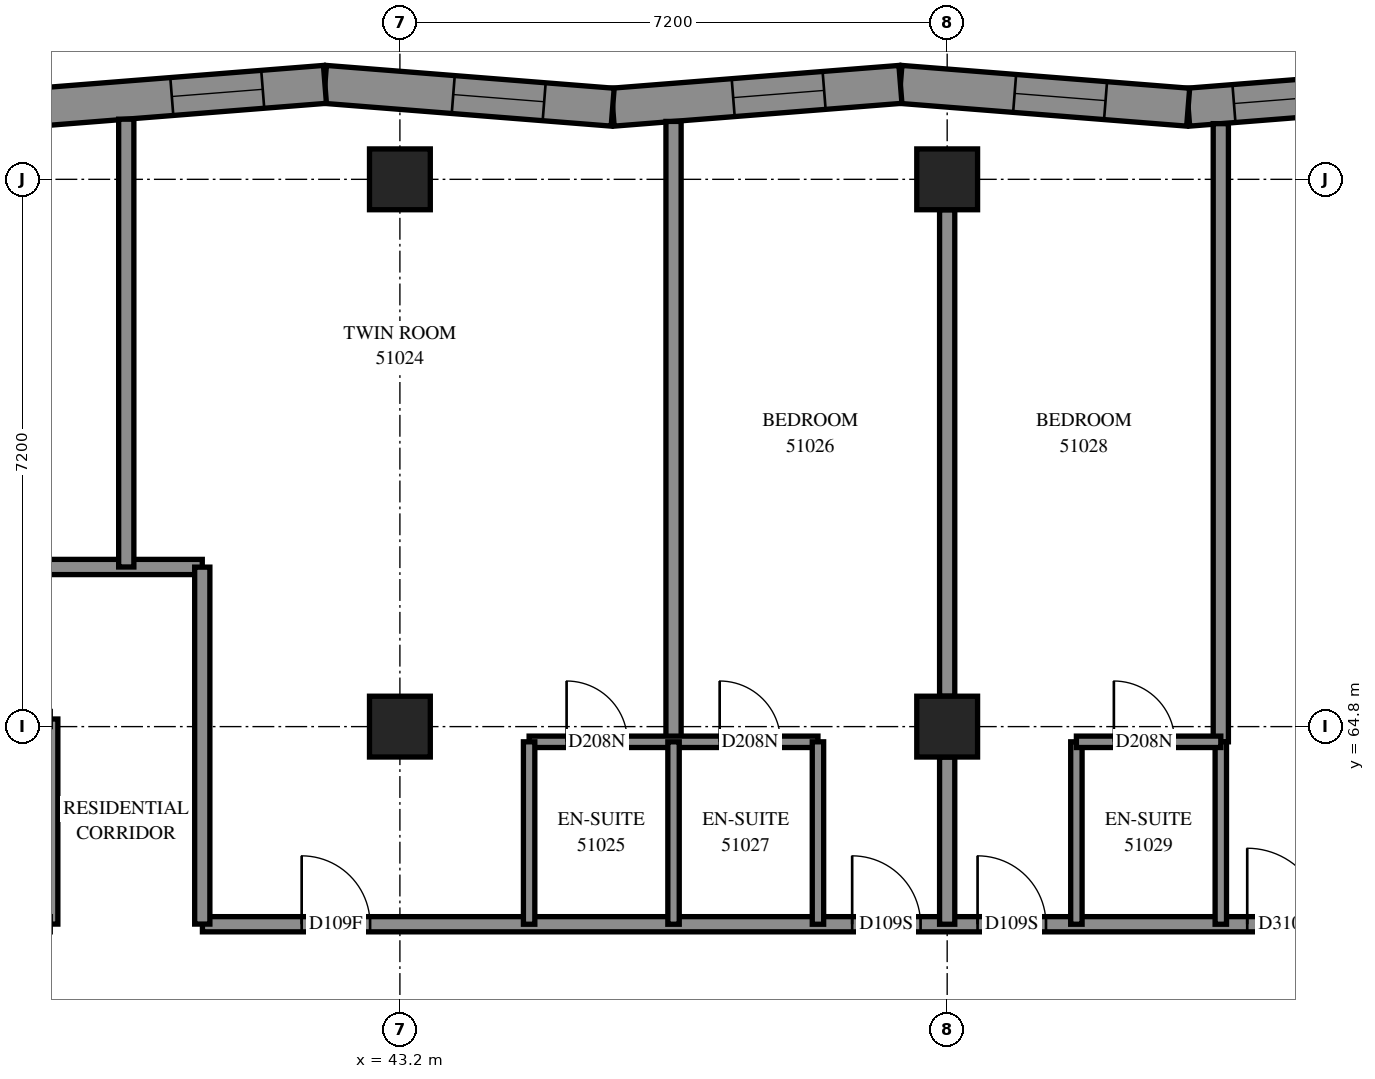
"""IFC4 building model, lengths in metres.
Left out: names, types, materials, properties, quantities, classifications, styles, units other than length and angle.
Written with IfcOpenShell. Run it as: python <this file> out.ifc"""

import sys

from ifc_helpers import new_model, si_unit, direction, frame, frame_2d, origin, origin_2d, place, context, subcontext, project, spatial, polyline, rectangle, outline, extrude, element, fill, save


model = new_model("IFC4")
c1 = context("Model", 3, precision=1e-05, world=origin(), true_north=direction((0.0, 1.0)))
c2 = subcontext(c1, "Body", "Model", "MODEL_VIEW")
j1 = project(units=[si_unit("LENGTHUNIT", "METRE"), si_unit("PLANEANGLEUNIT", "RADIAN")], contexts=[c1])
p1 = place(None, origin())
s1 = spatial("IfcSite", under=j1, at=p1, CompositionType="ELEMENT")
p2 = place(p1, origin())
s2 = spatial("IfcBuilding", under=s1, at=p2, CompositionType="ELEMENT")
p3 = place(p2, frame((0.0, 0.0, 189.6)))
s3 = spatial("IfcBuildingStorey", under=s2, at=p3, CompositionType="ELEMENT", Elevation=189.6)
for number, where, z_axis, x_axis in (
    (1, (43.2, 64.8, 0.0), (0.0, 0.0, 1.0), (1.0, 0.0, 0.0)),
    (2, (43.2, 72.0, 0.0), (0.0, 0.0, 1.0), (1.0, 0.0, 0.0)),
    (3, (50.4, 64.8, 0.0), (0.0, 0.0, 1.0), (1.0, 0.0, 0.0)),
    (4, (50.4, 72.0, 0.0), (0.0, 0.0, 1.0), (1.0, 0.0, 0.0)),
):
    element("IfcColumn", number, at=place(p3, frame(where, z_axis=z_axis, x_axis=x_axis)), inside=s3, PredefinedType="COLUMN", context=c2, shape_type="SweptSolid", body=[
        extrude(rectangle(XDim=0.8, YDim=0.8, at=origin_2d()), origin(), (0.0, 0.0, 1.0), 3.1),
    ])
p4 = place(p3, frame((57.356, 73.249, 0.0), z_axis=(0.0, 0.0, 1.0), x_axis=(-0.9968746163, -0.078999996, 0.0)))
e5 = element("IfcWall", 5, at=p4, inside=s3, PredefinedType="SOLIDWALL", context=c2, shape_type="SweptSolid", body=[
    extrude(outline(polyline([(-0.02, -0.25), (3.778, -0.25), (3.817, 0.25), (0.02, 0.25), (-0.02, -0.25)])), origin(), (0.0, 0.0, 1.0), 3.1),
])
p5 = place(p4, frame((0.393, 0.0, 0.45)))
e6 = element("IfcOpeningElement", 6, at=p5, cuts=e5, PredefinedType="OPENING", context=c2, shape_type="SweptSolid", body=[
    extrude(rectangle(XDim=1.3, YDim=2.5, at=frame_2d((0.65, 1.25))), frame((0.0, 0.26, 0.0), z_axis=(0.0, -1.0, 0.0), x_axis=(1.0, 0.0, 0.0)), (0.0, 0.0, 1.0), 0.52),
])
p6 = place(p4, frame((1.893, 0.0, 0.45)))
e7 = element("IfcOpeningElement", 7, at=p6, cuts=e5, PredefinedType="OPENING", context=c2, shape_type="SweptSolid", body=[
    extrude(rectangle(XDim=1.3, YDim=2.5, at=frame_2d((0.65, 1.25))), frame((0.0, 0.26, 0.0), z_axis=(0.0, -1.0, 0.0), x_axis=(1.0, 0.0, 0.0)), (0.0, 0.0, 1.0), 0.52),
])
p7 = place(p3, frame((53.571, 72.949, 0.0), z_axis=(0.0, 0.0, 1.0), x_axis=(-0.9968747806, 0.0789979222, 0.0)))
e8 = element("IfcWall", 8, at=p7, inside=s3, PredefinedType="SOLIDWALL", context=c2, shape_type="SweptSolid", body=[
    extrude(outline(polyline([(0.02, -0.25), (3.817, -0.25), (3.778, 0.25), (-0.02, 0.25), (0.02, -0.25)])), origin(), (0.0, 0.0, 1.0), 3.1),
])
p8 = place(p7, frame((1.09, 0.0, 0.45)))
e9 = element("IfcOpeningElement", 9, at=p8, cuts=e8, PredefinedType="OPENING", context=c2, shape_type="SweptSolid", body=[
    extrude(rectangle(XDim=1.2, YDim=2.5, at=frame_2d((0.6, 1.25))), frame((0.0, 0.26, 0.0), z_axis=(0.0, -1.0, 0.0), x_axis=(1.0, 0.0, 0.0)), (0.0, 0.0, 1.0), 0.52),
])
p9 = place(p3, frame((49.785, 73.249, 0.0), z_axis=(0.0, 0.0, 1.0), x_axis=(-0.9968746163, -0.078999996, 0.0)))
e10 = element("IfcWall", 10, at=p9, inside=s3, PredefinedType="SOLIDWALL", context=c2, shape_type="SweptSolid", body=[
    extrude(outline(polyline([(-0.02, -0.25), (3.778, -0.25), (3.817, 0.25), (0.02, 0.25), (-0.02, -0.25)])), origin(), (0.0, 0.0, 1.0), 3.1),
])
p10 = place(p9, frame((1.007, 0.0, 0.45)))
e11 = element("IfcOpeningElement", 11, at=p10, cuts=e10, PredefinedType="OPENING", context=c2, shape_type="SweptSolid", body=[
    extrude(rectangle(XDim=1.2, YDim=2.5, at=frame_2d((0.6, 1.25))), frame((0.0, 0.26, 0.0), z_axis=(0.0, -1.0, 0.0), x_axis=(1.0, 0.0, 0.0)), (0.0, 0.0, 1.0), 0.52),
])
p11 = place(p3, frame((45.999, 72.949, 0.0), z_axis=(0.0, 0.0, 1.0), x_axis=(-0.9968746163, 0.078999996, 0.0)))
e12 = element("IfcWall", 12, at=p11, inside=s3, PredefinedType="SOLIDWALL", context=c2, shape_type="SweptSolid", body=[
    extrude(outline(polyline([(0.02, -0.25), (3.817, -0.25), (3.778, 0.25), (-0.02, 0.25), (0.02, -0.25)])), origin(), (0.0, 0.0, 1.0), 3.1),
])
p12 = place(p11, frame((0.904, 0.0, 0.45)))
e13 = element("IfcOpeningElement", 13, at=p12, cuts=e12, PredefinedType="OPENING", context=c2, shape_type="SweptSolid", body=[
    extrude(rectangle(XDim=1.2, YDim=2.5, at=frame_2d((0.6, 1.25))), frame((0.0, 0.26, 0.0), z_axis=(0.0, -1.0, 0.0), x_axis=(1.0, 0.0, 0.0)), (0.0, 0.0, 1.0), 0.52),
])
p13 = place(p3, frame((42.214, 73.249, 0.0), z_axis=(0.0, 0.0, 1.0), x_axis=(-0.9968746163, -0.078999996, 0.0)))
e14 = element("IfcWall", 14, at=p13, inside=s3, PredefinedType="SOLIDWALL", context=c2, shape_type="SweptSolid", body=[
    extrude(outline(polyline([(-0.02, -0.25), (3.778, -0.25), (3.817, 0.25), (0.02, 0.25), (-0.02, -0.25)])), origin(), (0.0, 0.0, 1.0), 3.1),
])
p14 = place(p13, frame((0.821, 0.0, 0.45)))
e15 = element("IfcOpeningElement", 15, at=p14, cuts=e14, PredefinedType="OPENING", context=c2, shape_type="SweptSolid", body=[
    extrude(rectangle(XDim=1.2, YDim=2.5, at=frame_2d((0.6, 1.25))), frame((0.0, 0.26, 0.0), z_axis=(0.0, -1.0, 0.0), x_axis=(1.0, 0.0, 0.0)), (0.0, 0.0, 1.0), 0.52),
])
p15 = place(p3, frame((21.602, 66.9, 0.0), z_axis=(0.0, 0.0, 1.0), x_axis=(1.0, 0.0, 0.0)))
e16 = element("IfcWall", 16, at=p15, inside=s3, PredefinedType="PARTITIONING", context=c2, shape_type="SweptSolid", body=[
    extrude(rectangle(XDim=18.998, YDim=0.2, at=frame_2d((9.499, 0.0))), origin(), (0.0, 0.0, 1.0), 3.1),
])
p16 = place(p15, frame((5.972, 0.0, 0.0)))
e17 = element("IfcOpeningElement", 17, at=p16, cuts=e16, PredefinedType="OPENING", context=c2, shape_type="SweptSolid", body=[
    extrude(rectangle(XDim=1.0, YDim=2.1, at=frame_2d((0.5, 1.05))), frame((0.0, 0.11, 0.0), z_axis=(0.0, -1.0, 0.0), x_axis=(1.0, 0.0, 0.0)), (0.0, 0.0, 1.0), 0.22),
])
p17 = place(p15, frame((13.172, 0.0, 0.0)))
e18 = element("IfcOpeningElement", 18, at=p17, cuts=e16, PredefinedType="OPENING", context=c2, shape_type="SweptSolid", body=[
    extrude(rectangle(XDim=1.0, YDim=2.1, at=frame_2d((0.5, 1.05))), frame((0.0, 0.11, 0.0), z_axis=(0.0, -1.0, 0.0), x_axis=(1.0, 0.0, 0.0)), (0.0, 0.0, 1.0), 0.22),
])
p18 = place(p3, frame((40.602, 62.2, 0.0), z_axis=(0.0, 0.0, 1.0), x_axis=(1.0, 0.0, 0.0)))
e19 = element("IfcWall", 19, at=p18, inside=s3, PredefinedType="PARTITIONING", context=c2, shape_type="SweptSolid", body=[
    extrude(rectangle(XDim=14.998, YDim=0.2, at=frame_2d((7.499, 0.0))), origin(), (0.0, 0.0, 1.0), 3.1),
])
p19 = place(p18, frame((1.306, 0.0, 0.0)))
e20 = element("IfcOpeningElement", 20, at=p19, cuts=e19, PredefinedType="OPENING", context=c2, shape_type="SweptSolid", body=[
    extrude(rectangle(XDim=0.9, YDim=2.1, at=frame_2d((0.45, 1.05))), frame((0.0, 0.11, 0.0), z_axis=(0.0, -1.0, 0.0), x_axis=(1.0, 0.0, 0.0)), (0.0, 0.0, 1.0), 0.22),
])
p20 = place(p18, frame((8.548, 0.0, 0.0)))
e21 = element("IfcOpeningElement", 21, at=p20, cuts=e19, PredefinedType="OPENING", context=c2, shape_type="SweptSolid", body=[
    extrude(rectangle(XDim=0.9, YDim=2.1, at=frame_2d((0.45, 1.05))), frame((0.0, 0.11, 0.0), z_axis=(0.0, -1.0, 0.0), x_axis=(1.0, 0.0, 0.0)), (0.0, 0.0, 1.0), 0.22),
])
p21 = place(p18, frame((10.198, 0.0, 0.0)))
e22 = element("IfcOpeningElement", 22, at=p21, cuts=e19, PredefinedType="OPENING", context=c2, shape_type="SweptSolid", body=[
    extrude(rectangle(XDim=0.9, YDim=2.1, at=frame_2d((0.45, 1.05))), frame((0.0, 0.11, 0.0), z_axis=(0.0, -1.0, 0.0), x_axis=(1.0, 0.0, 0.0)), (0.0, 0.0, 1.0), 0.22),
])
p22 = place(p18, frame((13.746, 0.0, 0.0)))
e23 = element("IfcOpeningElement", 23, at=p22, cuts=e19, PredefinedType="OPENING", context=c2, shape_type="SweptSolid", body=[
    extrude(rectangle(XDim=1.0, YDim=2.1, at=frame_2d((0.5, 1.05))), frame((0.0, 0.11, 0.0), z_axis=(0.0, -1.0, 0.0), x_axis=(1.0, 0.0, 0.0)), (0.0, 0.0, 1.0), 0.22),
])
p23 = place(p3, frame((46.8, 64.6, 0.0), z_axis=(0.0, 0.0, 1.0), x_axis=(0.0, 1.0, 0.0)))
e24 = element("IfcWall", 24, at=p23, inside=s3, PredefinedType="PARTITIONING", context=c2, shape_type="SweptSolid", body=[
    extrude(rectangle(XDim=8.162, YDim=0.2, at=frame_2d((4.081, 0.0))), origin(), (0.0, 0.0, 1.0), 3.1),
])
p24 = place(p3, frame((54.0, 64.6, 0.0), z_axis=(0.0, 0.0, 1.0), x_axis=(0.0, 1.0, 0.0)))
e25 = element("IfcWall", 25, at=p24, inside=s3, PredefinedType="PARTITIONING", context=c2, shape_type="SweptSolid", body=[
    extrude(rectangle(XDim=8.133, YDim=0.2, at=frame_2d((4.066, 0.0))), origin(), (0.0, 0.0, 1.0), 3.1),
])
p25 = place(p3, frame((50.4, 65.2, 0.0), z_axis=(0.0, 0.0, 1.0), x_axis=(0.0, 1.0, 0.0)))
e26 = element("IfcWall", 26, at=p25, inside=s3, PredefinedType="PARTITIONING", context=c2, shape_type="SweptSolid", body=[
    extrude(rectangle(XDim=6.4, YDim=0.2, at=frame_2d((3.2, 0.0))), origin(), (0.0, 0.0, 1.0), 3.1),
])
p26 = place(p3, frame((39.6, 66.9, 0.0), z_axis=(0.0, 0.0, 1.0), x_axis=(0.0, 1.0, 0.0)))
e27 = element("IfcWall", 27, at=p26, inside=s3, PredefinedType="PARTITIONING", context=c2, shape_type="SweptSolid", body=[
    extrude(rectangle(XDim=5.891, YDim=0.2, at=frame_2d((2.946, 0.0))), origin(), (0.0, 0.0, 1.0), 3.1),
])
p27 = place(p3, frame((40.6, 62.202, 0.0), z_axis=(0.0, 0.0, 1.0), x_axis=(0.0, 1.0, 0.0)))
e28 = element("IfcWall", 28, at=p27, inside=s3, PredefinedType="PARTITIONING", context=c2, shape_type="SweptSolid", body=[
    extrude(rectangle(XDim=4.696, YDim=0.2, at=frame_2d((2.348, 0.0))), origin(), (0.0, 0.0, 1.0), 3.1),
])
p28 = place(p3, frame((44.9, 64.6, 0.0), z_axis=(0.0, 0.0, 1.0), x_axis=(1.0, 0.0, 0.0)))
e29 = element("IfcWall", 29, at=p28, inside=s3, PredefinedType="PARTITIONING", context=c2, shape_type="SweptSolid", body=[
    extrude(rectangle(XDim=3.8, YDim=0.15, at=frame_2d((1.9, 0.0))), origin(), (0.0, 0.0, 1.0), 3.1),
])
p29 = place(p28, frame((0.493, 0.0, 0.0)))
e30 = element("IfcOpeningElement", 30, at=p29, cuts=e29, PredefinedType="OPENING", context=c2, shape_type="SweptSolid", body=[
    extrude(rectangle(XDim=0.8, YDim=2.1, at=frame_2d((0.4, 1.05))), frame((0.0, 0.085, 0.0), z_axis=(0.0, -1.0, 0.0), x_axis=(1.0, 0.0, 0.0)), (0.0, 0.0, 1.0), 0.17),
])
p30 = place(p28, frame((2.507, 0.0, 0.0)))
e31 = element("IfcOpeningElement", 31, at=p30, cuts=e29, PredefinedType="OPENING", context=c2, shape_type="SweptSolid", body=[
    extrude(rectangle(XDim=0.8, YDim=2.1, at=frame_2d((0.4, 1.05))), frame((0.0, 0.085, 0.0), z_axis=(0.0, -1.0, 0.0), x_axis=(1.0, 0.0, 0.0)), (0.0, 0.0, 1.0), 0.17),
])
p31 = place(p3, frame((38.6, 62.202, 0.0), z_axis=(0.0, 0.0, 1.0), x_axis=(0.0, 1.0, 0.0)))
e32 = element("IfcWall", 32, at=p31, inside=s3, PredefinedType="PARTITIONING", context=c2, shape_type="SweptSolid", body=[
    extrude(rectangle(XDim=2.698, YDim=0.2, at=frame_2d((1.349, 0.0))), origin(), (0.0, 0.0, 1.0), 3.1),
])
for number, where, z_axis, x_axis in (
    (33, (44.9, 62.2, 0.0), (0.0, 0.0, 1.0), (0.0, 1.0, 0.0)),
    (34, (46.8, 62.2, 0.0), (0.0, 0.0, 1.0), (0.0, 1.0, 0.0)),
    (35, (48.7, 62.2, 0.0), (0.0, 0.0, 1.0), (0.0, 1.0, 0.0)),
    (36, (52.1, 62.2, 0.0), (0.0, 0.0, 1.0), (0.0, 1.0, 0.0)),
    (37, (54.0, 62.2, 0.0), (0.0, 0.0, 1.0), (0.0, 1.0, 0.0)),
):
    element("IfcWall", number, at=place(p3, frame(where, z_axis=z_axis, x_axis=x_axis)), inside=s3, PredefinedType="PARTITIONING", context=c2, shape_type="SweptSolid", body=[
        extrude(rectangle(XDim=2.4, YDim=0.15, at=frame_2d((1.2, 0.0))), origin(), (0.0, 0.0, 1.0), 3.1),
    ])
p32 = place(p3, frame((50.4, 62.2, 0.0), z_axis=(0.0, 0.0, 1.0), x_axis=(0.0, 1.0, 0.0)))
e38 = element("IfcWall", 38, at=p32, inside=s3, PredefinedType="PARTITIONING", context=c2, shape_type="SweptSolid", body=[
    extrude(rectangle(XDim=2.2, YDim=0.2, at=frame_2d((1.1, 0.0))), origin(), (0.0, 0.0, 1.0), 3.1),
])
p33 = place(p3, frame((52.1, 64.6, 0.0), z_axis=(0.0, 0.0, 1.0), x_axis=(1.0, 0.0, 0.0)))
e39 = element("IfcWall", 39, at=p33, inside=s3, PredefinedType="PARTITIONING", context=c2, shape_type="SweptSolid", body=[
    extrude(rectangle(XDim=1.9, YDim=0.15, at=frame_2d((0.95, 0.0))), origin(), (0.0, 0.0, 1.0), 3.1),
])
p34 = place(p33, frame((0.493, 0.0, 0.0)))
e40 = element("IfcOpeningElement", 40, at=p34, cuts=e39, PredefinedType="OPENING", context=c2, shape_type="SweptSolid", body=[
    extrude(rectangle(XDim=0.8, YDim=2.1, at=frame_2d((0.4, 1.05))), frame((0.0, 0.085, 0.0), z_axis=(0.0, -1.0, 0.0), x_axis=(1.0, 0.0, 0.0)), (0.0, 0.0, 1.0), 0.17),
])
p35 = place(p6, origin())
e41 = element("IfcWindow", 41, at=p35, inside=s3, PartitioningType="SINGLE_PANEL", PredefinedType="WINDOW", context=c2, shape_type="SweptSolid", body=[
    extrude(rectangle(XDim=1.3, YDim=2.5, at=frame_2d((0.65, 1.25))), frame((0.0, 0.18, 0.0), z_axis=(0.0, -1.0, 0.0), x_axis=(1.0, 0.0, 0.0)), (0.0, 0.0, 1.0), 0.06),
])
fill(e7, e41)
p36 = place(p8, origin())
e42 = element("IfcWindow", 42, at=p36, inside=s3, PartitioningType="SINGLE_PANEL", PredefinedType="WINDOW", context=c2, shape_type="SweptSolid", body=[
    extrude(rectangle(XDim=1.2, YDim=2.5, at=frame_2d((0.6, 1.25))), frame((0.0, 0.18, 0.0), z_axis=(0.0, -1.0, 0.0), x_axis=(1.0, 0.0, 0.0)), (0.0, 0.0, 1.0), 0.06),
])
fill(e9, e42)
p37 = place(p10, origin())
e43 = element("IfcWindow", 43, at=p37, inside=s3, PartitioningType="SINGLE_PANEL", PredefinedType="WINDOW", context=c2, shape_type="SweptSolid", body=[
    extrude(rectangle(XDim=1.2, YDim=2.5, at=frame_2d((0.6, 1.25))), frame((0.0, 0.18, 0.0), z_axis=(0.0, -1.0, 0.0), x_axis=(1.0, 0.0, 0.0)), (0.0, 0.0, 1.0), 0.06),
])
fill(e11, e43)
p38 = place(p12, origin())
e44 = element("IfcWindow", 44, at=p38, inside=s3, PartitioningType="SINGLE_PANEL", PredefinedType="WINDOW", context=c2, shape_type="SweptSolid", body=[
    extrude(rectangle(XDim=1.2, YDim=2.5, at=frame_2d((0.6, 1.25))), frame((0.0, 0.18, 0.0), z_axis=(0.0, -1.0, 0.0), x_axis=(1.0, 0.0, 0.0)), (0.0, 0.0, 1.0), 0.06),
])
fill(e13, e44)
p39 = place(p14, origin())
e45 = element("IfcWindow", 45, at=p39, inside=s3, PartitioningType="SINGLE_PANEL", PredefinedType="WINDOW", context=c2, shape_type="SweptSolid", body=[
    extrude(rectangle(XDim=1.2, YDim=2.5, at=frame_2d((0.6, 1.25))), frame((0.0, 0.18, 0.0), z_axis=(0.0, -1.0, 0.0), x_axis=(1.0, 0.0, 0.0)), (0.0, 0.0, 1.0), 0.06),
])
fill(e15, e45)
p40 = place(p19, origin())
e46 = element("IfcDoor", 46, at=p40, inside=s3, OperationType="SINGLE_SWING_LEFT", PredefinedType="DOOR", context=c2, shape_type="SweptSolid", body=[
    extrude(rectangle(XDim=0.9, YDim=2.1, at=frame_2d((0.45, 1.05))), frame((0.0, 0.025, 0.0), z_axis=(0.0, -1.0, 0.0), x_axis=(1.0, 0.0, 0.0)), (0.0, 0.0, 1.0), 0.05),
])
fill(e20, e46)
p41 = place(p29, origin())
e47 = element("IfcDoor", 47, at=p41, inside=s3, OperationType="SINGLE_SWING_RIGHT", PredefinedType="DOOR", context=c2, shape_type="SweptSolid", body=[
    extrude(rectangle(XDim=0.8, YDim=2.1, at=frame_2d((0.4, 1.05))), frame((0.0, 0.025, 0.0), z_axis=(0.0, -1.0, 0.0), x_axis=(1.0, 0.0, 0.0)), (0.0, 0.0, 1.0), 0.05),
])
fill(e30, e47)
p42 = place(p20, origin())
e48 = element("IfcDoor", 48, at=p42, inside=s3, OperationType="SINGLE_SWING_LEFT", PredefinedType="DOOR", context=c2, shape_type="SweptSolid", body=[
    extrude(rectangle(XDim=0.9, YDim=2.1, at=frame_2d((0.45, 1.05))), frame((0.0, 0.025, 0.0), z_axis=(0.0, -1.0, 0.0), x_axis=(1.0, 0.0, 0.0)), (0.0, 0.0, 1.0), 0.05),
])
fill(e21, e48)
p43 = place(p30, origin())
e49 = element("IfcDoor", 49, at=p43, inside=s3, OperationType="SINGLE_SWING_RIGHT", PredefinedType="DOOR", context=c2, shape_type="SweptSolid", body=[
    extrude(rectangle(XDim=0.8, YDim=2.1, at=frame_2d((0.4, 1.05))), frame((0.0, 0.025, 0.0), z_axis=(0.0, -1.0, 0.0), x_axis=(1.0, 0.0, 0.0)), (0.0, 0.0, 1.0), 0.05),
])
fill(e31, e49)
p44 = place(p21, origin())
e50 = element("IfcDoor", 50, at=p44, inside=s3, OperationType="SINGLE_SWING_RIGHT", PredefinedType="DOOR", context=c2, shape_type="SweptSolid", body=[
    extrude(rectangle(XDim=0.9, YDim=2.1, at=frame_2d((0.45, 1.05))), frame((0.0, 0.025, 0.0), z_axis=(0.0, -1.0, 0.0), x_axis=(1.0, 0.0, 0.0)), (0.0, 0.0, 1.0), 0.05),
])
fill(e22, e50)
p45 = place(p34, origin())
e51 = element("IfcDoor", 51, at=p45, inside=s3, OperationType="SINGLE_SWING_RIGHT", PredefinedType="DOOR", context=c2, shape_type="SweptSolid", body=[
    extrude(rectangle(XDim=0.8, YDim=2.1, at=frame_2d((0.4, 1.05))), frame((0.0, 0.025, 0.0), z_axis=(0.0, -1.0, 0.0), x_axis=(1.0, 0.0, 0.0)), (0.0, 0.0, 1.0), 0.05),
])
fill(e40, e51)
p46 = place(p22, origin())
e52 = element("IfcDoor", 52, at=p46, inside=s3, OperationType="SINGLE_SWING_LEFT", PredefinedType="DOOR", context=c2, shape_type="SweptSolid", body=[
    extrude(rectangle(XDim=1.0, YDim=2.1, at=frame_2d((0.5, 1.05))), frame((0.0, 0.025, 0.0), z_axis=(0.0, -1.0, 0.0), x_axis=(1.0, 0.0, 0.0)), (0.0, 0.0, 1.0), 0.05),
])
fill(e23, e52)
save(model, sys.argv[1])
